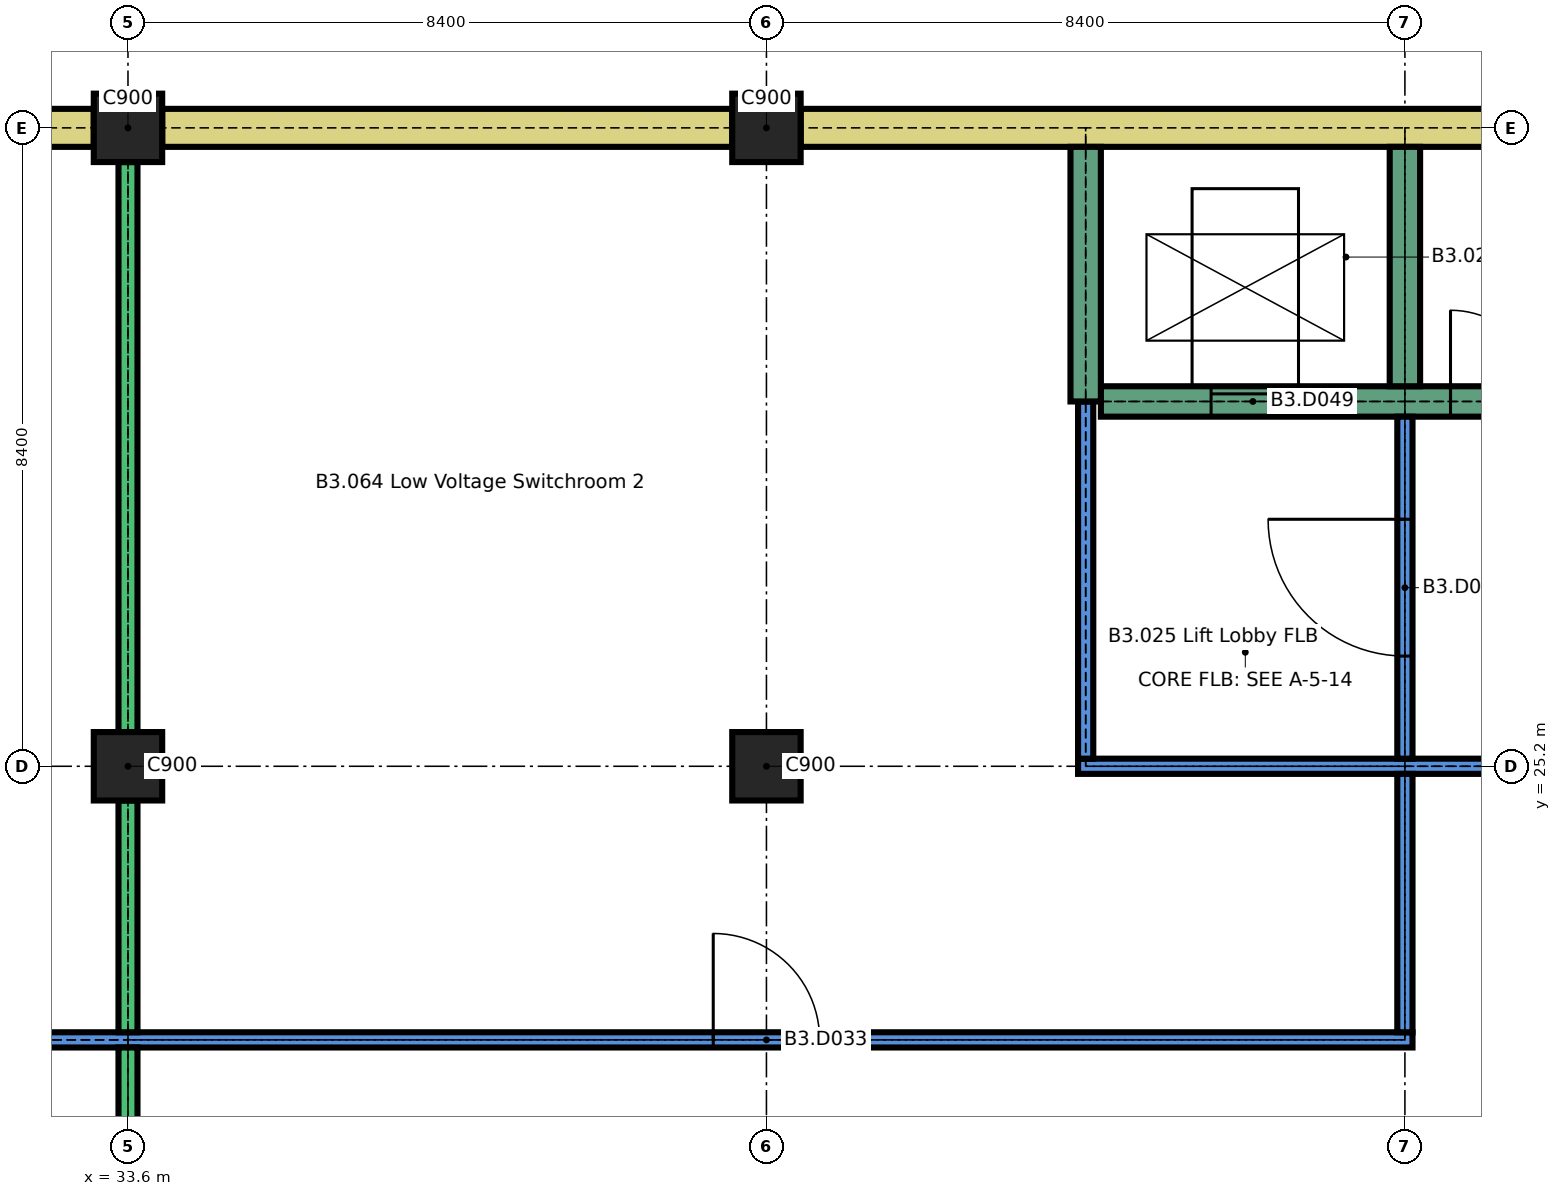
"""IFC4 building model, lengths in metres.
Left out: names, types, materials, properties, quantities, classifications, styles, units other than length and angle.
Written with IfcOpenShell. Run it as: python <this file> out.ifc"""

import sys

from ifc_helpers import new_model, si_unit, direction, frame, frame_2d, origin, origin_2d, place, context, subcontext, project, spatial, rectangle, extrude, element, fill, save


model = new_model("IFC4")
c1 = context("Model", 3, precision=1e-05, world=origin(), true_north=direction((0.0, 1.0)))
c2 = subcontext(c1, "Body", "Model", "MODEL_VIEW")
j1 = project(units=[si_unit("LENGTHUNIT", "METRE"), si_unit("PLANEANGLEUNIT", "RADIAN")], contexts=[c1])
p1 = place(None, origin())
s1 = spatial("IfcSite", under=j1, at=p1, CompositionType="ELEMENT")
p2 = place(p1, origin())
s2 = spatial("IfcBuilding", under=s1, at=p2, CompositionType="ELEMENT")
p3 = place(p2, frame((0.0, 0.0, -11.4)))
s3 = spatial("IfcBuildingStorey", under=s2, at=p3, CompositionType="ELEMENT", Elevation=-11.4)
for number, where, z_axis, x_axis in (
    (1, (33.6, 25.2, 0.0), (0.0, 0.0, 1.0), (1.0, 0.0, 0.0)),
    (2, (42.0, 25.2, 0.0), (0.0, 0.0, 1.0), (1.0, 0.0, 0.0)),
    (3, (33.6, 33.6, 0.0), (0.0, 0.0, 1.0), (1.0, 0.0, 0.0)),
    (4, (42.0, 33.6, 0.0), (0.0, 0.0, 1.0), (1.0, 0.0, 0.0)),
):
    element("IfcColumn", number, at=place(p3, frame(where, z_axis=z_axis, x_axis=x_axis)), inside=s3, PredefinedType="COLUMN", context=c2, shape_type="SweptSolid", body=[
        extrude(rectangle(XDim=0.9, YDim=0.9, at=origin_2d()), origin(), (0.0, 0.0, 1.0), 3.2),
    ])
for number, where, z_axis, x_axis in (
    (5, (25.65, 33.6, 0.0), (0.0, 0.0, 1.0), (1.0, 0.0, 0.0)),
    (6, (34.05, 33.6, 0.0), (0.0, 0.0, 1.0), (1.0, 0.0, 0.0)),
):
    element("IfcWall", number, at=place(p3, frame(where, z_axis=z_axis, x_axis=x_axis)), inside=s3, PredefinedType="SOLIDWALL", context=c2, shape_type="SweptSolid", body=[
        extrude(rectangle(XDim=7.5, YDim=0.5, at=frame_2d((3.75, 0.0))), origin(), (0.0, 0.0, 1.0), 3.2),
    ])
p4 = place(p3, frame((42.45, 33.6, 0.0), z_axis=(0.0, 0.0, 1.0), x_axis=(1.0, 0.0, 0.0)))
e7 = element("IfcWall", 7, at=p4, inside=s3, PredefinedType="SOLIDWALL", context=c2, shape_type="SweptSolid", body=[
    extrude(rectangle(XDim=41.1, YDim=0.5, at=frame_2d((20.55, 0.0))), origin(), (0.0, 0.0, 1.0), 3.2),
])
p5 = place(p3, frame((29.4, 21.6, 0.0), z_axis=(0.0, 0.0, 1.0), x_axis=(1.0, 0.0, 0.0)))
e8 = element("IfcWall", 8, at=p5, inside=s3, PredefinedType="PARTITIONING", context=c2, shape_type="SweptSolid", body=[
    extrude(rectangle(XDim=21.1, YDim=0.2, at=frame_2d((10.55, 0.0))), origin(), (0.0, 0.0, 1.0), 3.2),
])
p6 = place(p5, frame((11.9, 0.0, 0.0)))
e9 = element("IfcOpeningElement", 9, at=p6, cuts=e8, PredefinedType="OPENING", context=c2, shape_type="SweptSolid", body=[
    extrude(rectangle(XDim=1.4, YDim=2.1, at=frame_2d((0.7, 1.05))), frame((0.0, 0.11, 0.0), z_axis=(0.0, -1.0, 0.0), x_axis=(1.0, 0.0, 0.0)), (0.0, 0.0, 1.0), 0.22),
])
p7 = place(p3, frame((46.1, 25.2, 0.0), z_axis=(0.0, 0.0, 1.0), x_axis=(1.0, 0.0, 0.0)))
e10 = element("IfcWall", 10, at=p7, inside=s3, PredefinedType="PARTITIONING", context=c2, shape_type="SweptSolid", body=[
    extrude(rectangle(XDim=12.6, YDim=0.2, at=frame_2d((6.3, 0.0))), origin(), (0.0, 0.0, 1.0), 3.2),
])
p8 = place(p7, frame((7.75, 0.0, 0.0)))
e11 = element("IfcOpeningElement", 11, at=p8, cuts=e10, PredefinedType="OPENING", context=c2, shape_type="SweptSolid", body=[
    extrude(rectangle(XDim=1.4, YDim=2.1, at=frame_2d((0.7, 1.05))), frame((0.0, 0.11, 0.0), z_axis=(0.0, -1.0, 0.0), x_axis=(1.0, 0.0, 0.0)), (0.0, 0.0, 1.0), 0.22),
])
p9 = place(p3, frame((46.4, 30.0, 0.0), z_axis=(0.0, 0.0, 1.0), x_axis=(1.0, 0.0, 0.0)))
e12 = element("IfcWall", 12, at=p9, inside=s3, PredefinedType="SHEAR", context=c2, shape_type="SweptSolid", body=[
    extrude(rectangle(XDim=12.2, YDim=0.4, at=frame_2d((6.1, 0.0))), origin(), (0.0, 0.0, 1.0), 3.2),
])
p10 = place(p9, frame((1.45, 0.0, 0.0)))
e13 = element("IfcOpeningElement", 13, at=p10, cuts=e12, PredefinedType="OPENING", context=c2, shape_type="SweptSolid", body=[
    extrude(rectangle(XDim=1.1, YDim=2.1, at=frame_2d((0.55, 1.05))), frame((0.0, 0.21, 0.0), z_axis=(0.0, -1.0, 0.0), x_axis=(1.0, 0.0, 0.0)), (0.0, 0.0, 1.0), 0.42),
])
p11 = place(p9, frame((4.6, 0.0, 0.0)))
e14 = element("IfcOpeningElement", 14, at=p11, cuts=e12, PredefinedType="OPENING", context=c2, shape_type="SweptSolid", body=[
    extrude(rectangle(XDim=1.2, YDim=2.1, at=frame_2d((0.6, 1.05))), frame((0.0, 0.21, 0.0), z_axis=(0.0, -1.0, 0.0), x_axis=(1.0, 0.0, 0.0)), (0.0, 0.0, 1.0), 0.42),
])
p12 = place(p3, frame((33.6, 17.25, 0.0), z_axis=(0.0, 0.0, 1.0), x_axis=(0.0, 1.0, 0.0)))
e15 = element("IfcWall", 15, at=p12, inside=s3, PredefinedType="SOLIDWALL", context=c2, shape_type="SweptSolid", body=[
    extrude(rectangle(XDim=4.25, YDim=0.25, at=frame_2d((2.125, 0.0))), origin(), (0.0, 0.0, 1.0), 3.2),
])
p13 = place(p12, frame((1.425, 0.0, 0.0)))
e16 = element("IfcOpeningElement", 16, at=p13, cuts=e15, PredefinedType="OPENING", context=c2, shape_type="SweptSolid", body=[
    extrude(rectangle(XDim=1.4, YDim=2.1, at=frame_2d((0.7, 1.05))), frame((0.0, 0.135, 0.0), z_axis=(0.0, -1.0, 0.0), x_axis=(1.0, 0.0, 0.0)), (0.0, 0.0, 1.0), 0.27),
])
p14 = place(p3, frame((33.6, 21.7, 0.0), z_axis=(0.0, 0.0, 1.0), x_axis=(0.0, 1.0, 0.0)))
e17 = element("IfcWall", 17, at=p14, inside=s3, PredefinedType="SOLIDWALL", context=c2, shape_type="SweptSolid", body=[
    extrude(rectangle(XDim=3.05, YDim=0.25, at=frame_2d((1.525, 0.0))), origin(), (0.0, 0.0, 1.0), 3.2),
])
p15 = place(p3, frame((33.6, 25.65, 0.0), z_axis=(0.0, 0.0, 1.0), x_axis=(0.0, 1.0, 0.0)))
e18 = element("IfcWall", 18, at=p15, inside=s3, PredefinedType="SOLIDWALL", context=c2, shape_type="SweptSolid", body=[
    extrude(rectangle(XDim=7.5, YDim=0.25, at=frame_2d((3.75, 0.0))), origin(), (0.0, 0.0, 1.0), 3.2),
])
p16 = place(p3, frame((46.2, 25.3, 0.0), z_axis=(0.0, 0.0, 1.0), x_axis=(0.0, 1.0, 0.0)))
e19 = element("IfcWall", 19, at=p16, inside=s3, PredefinedType="PARTITIONING", context=c2, shape_type="SweptSolid", body=[
    extrude(rectangle(XDim=4.7, YDim=0.2, at=frame_2d((2.35, 0.0))), origin(), (0.0, 0.0, 1.0), 3.2),
])
p17 = place(p3, frame((46.2, 30.0, 0.0), z_axis=(0.0, 0.0, 1.0), x_axis=(0.0, 1.0, 0.0)))
e20 = element("IfcWall", 20, at=p17, inside=s3, PredefinedType="SHEAR", context=c2, shape_type="SweptSolid", body=[
    extrude(rectangle(XDim=3.35, YDim=0.4, at=frame_2d((1.675, 0.0))), origin(), (0.0, 0.0, 1.0), 3.2),
])
p18 = place(p3, frame((50.4, 21.7, 0.0), z_axis=(0.0, 0.0, 1.0), x_axis=(0.0, 1.0, 0.0)))
e21 = element("IfcWall", 21, at=p18, inside=s3, PredefinedType="PARTITIONING", context=c2, shape_type="SweptSolid", body=[
    extrude(rectangle(XDim=3.4, YDim=0.2, at=frame_2d((1.7, 0.0))), origin(), (0.0, 0.0, 1.0), 3.2),
])
p19 = place(p3, frame((50.4, 25.3, 0.0), z_axis=(0.0, 0.0, 1.0), x_axis=(0.0, 1.0, 0.0)))
e22 = element("IfcWall", 22, at=p19, inside=s3, PredefinedType="PARTITIONING", context=c2, shape_type="SweptSolid", body=[
    extrude(rectangle(XDim=4.5, YDim=0.2, at=frame_2d((2.25, 0.0))), origin(), (0.0, 0.0, 1.0), 3.2),
])
p20 = place(p19, frame((1.35, 0.0, 0.0)))
e23 = element("IfcOpeningElement", 23, at=p20, cuts=e22, PredefinedType="OPENING", context=c2, shape_type="SweptSolid", body=[
    extrude(rectangle(XDim=1.8, YDim=2.4, at=frame_2d((0.9, 1.2))), frame((0.0, 0.11, 0.0), z_axis=(0.0, -1.0, 0.0), x_axis=(1.0, 0.0, 0.0)), (0.0, 0.0, 1.0), 0.22),
])
p21 = place(p3, frame((50.4, 30.2, 0.0), z_axis=(0.0, 0.0, 1.0), x_axis=(0.0, 1.0, 0.0)))
e24 = element("IfcWall", 24, at=p21, inside=s3, PredefinedType="SHEAR", context=c2, shape_type="SweptSolid", body=[
    extrude(rectangle(XDim=3.15, YDim=0.4, at=frame_2d((1.575, 0.0))), origin(), (0.0, 0.0, 1.0), 3.2),
])
p22 = place(p6, origin())
e25 = element("IfcDoor", 25, at=p22, inside=s3, OperationType="SINGLE_SWING_RIGHT", PredefinedType="DOOR", context=c2, shape_type="SweptSolid", body=[
    extrude(rectangle(XDim=1.4, YDim=2.1, at=frame_2d((0.7, 1.05))), frame((0.0, 0.025, 0.0), z_axis=(0.0, -1.0, 0.0), x_axis=(1.0, 0.0, 0.0)), (0.0, 0.0, 1.0), 0.05),
])
fill(e9, e25)
p23 = place(p10, origin())
e26 = element("IfcDoor", 26, at=p23, inside=s3, OperationType="SLIDING_TO_LEFT", PredefinedType="DOOR", context=c2, shape_type="SweptSolid", body=[
    extrude(rectangle(XDim=1.1, YDim=2.1, at=frame_2d((0.55, 1.05))), frame((0.0, 0.025, 0.0), z_axis=(0.0, -1.0, 0.0), x_axis=(1.0, 0.0, 0.0)), (0.0, 0.0, 1.0), 0.05),
])
fill(e13, e26)
p24 = place(p11, origin())
e27 = element("IfcDoor", 27, at=p24, inside=s3, OperationType="SINGLE_SWING_RIGHT", PredefinedType="DOOR", context=c2, shape_type="SweptSolid", body=[
    extrude(rectangle(XDim=1.2, YDim=2.1, at=frame_2d((0.6, 1.05))), frame((0.0, 0.025, 0.0), z_axis=(0.0, -1.0, 0.0), x_axis=(1.0, 0.0, 0.0)), (0.0, 0.0, 1.0), 0.05),
])
fill(e14, e27)
p25 = place(p20, origin())
e28 = element("IfcDoor", 28, at=p25, inside=s3, OperationType="SINGLE_SWING_LEFT", PredefinedType="DOOR", context=c2, shape_type="SweptSolid", body=[
    extrude(rectangle(XDim=1.8, YDim=2.4, at=frame_2d((0.9, 1.2))), frame((0.0, 0.025, 0.0), z_axis=(0.0, -1.0, 0.0), x_axis=(1.0, 0.0, 0.0)), (0.0, 0.0, 1.0), 0.05),
])
fill(e23, e28)
save(model, sys.argv[1])
